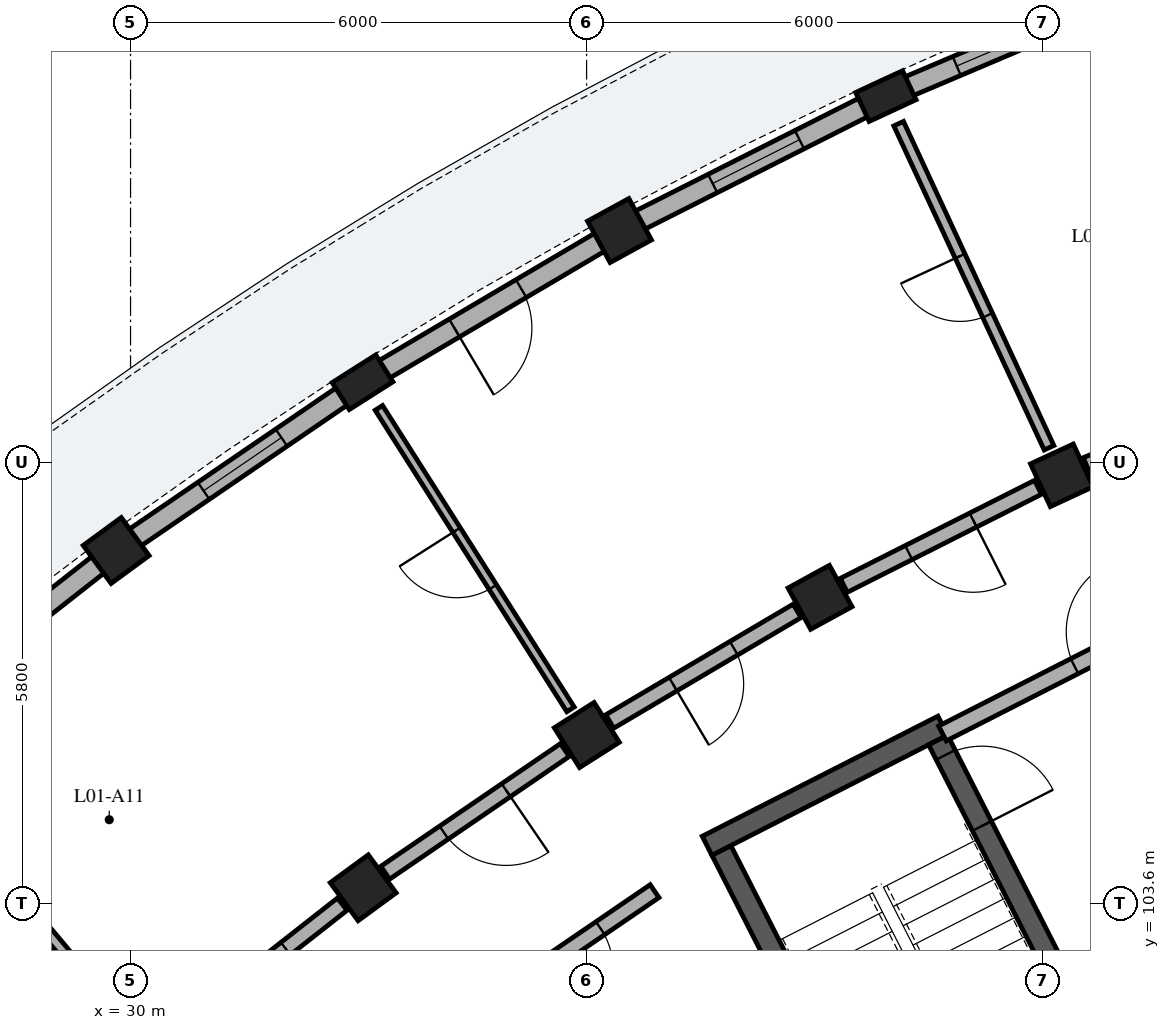
"""IFC4 building model, lengths in metres.
Left out: names, types, materials, properties, quantities, classifications, styles, units other than length and angle.
Written with IfcOpenShell. Run it as: python <this file> out.ifc"""

import sys

from ifc_helpers import new_model, si_unit, direction, frame, frame_2d, origin, origin_2d, place, context, subcontext, project, spatial, rectangle, extrude, element, fill, save


model = new_model("IFC4")
c1 = context("Model", 3, precision=1e-05, world=origin(), true_north=direction((0.0, 1.0)))
c2 = subcontext(c1, "Body", "Model", "MODEL_VIEW")
j1 = project(units=[si_unit("LENGTHUNIT", "METRE"), si_unit("PLANEANGLEUNIT", "RADIAN")], contexts=[c1])
p1 = place(None, origin())
s1 = spatial("IfcSite", under=j1, at=p1, CompositionType="ELEMENT")
p2 = place(p1, origin())
s2 = spatial("IfcBuilding", under=s1, at=p2, CompositionType="ELEMENT")
p3 = place(p2, frame((0.0, 0.0, 4.76)))
s3 = spatial("IfcBuildingStorey", under=s2, at=p3, CompositionType="ELEMENT", Elevation=4.76)
p4 = place(p3, frame((37.773, 104.296, 0.0), z_axis=(0.0, 0.0, 1.0), x_axis=(0.453992276384, -0.891005618941, 0.0)))
e1 = element("IfcWall", 1, at=p4, inside=s3, PredefinedType="SHEAR", context=c2, shape_type="SweptSolid", body=[
    extrude(rectangle(XDim=6.6, YDim=0.28, at=frame_2d((3.3, 0.0))), origin(), (0.0, 0.0, 1.0), 3.83),
])
p5 = place(p3, frame((37.585, 104.357, 0.0), z_axis=(0.0, 0.0, 1.0), x_axis=(0.891020222667, 0.453963613958, 0.0)))
e2 = element("IfcWall", 2, at=p5, inside=s3, PredefinedType="SHEAR", context=c2, shape_type="SweptSolid", body=[
    extrude(rectangle(XDim=3.48, YDim=0.28, at=frame_2d((1.74, 0.0))), origin(), (0.0, 0.0, 1.0), 3.83),
])
p6 = place(p3, frame((40.625, 105.748, 0.0), z_axis=(0.0, 0.0, 1.0), x_axis=(0.453992276384, -0.891005618941, 0.0)))
e3 = element("IfcWall", 3, at=p6, inside=s3, PredefinedType="SHEAR", context=c2, shape_type="SweptSolid", body=[
    extrude(rectangle(XDim=6.6, YDim=0.28, at=frame_2d((3.3, 0.0))), origin(), (0.0, 0.0, 1.0), 3.83),
])
p7 = place(p6, frame((0.22, 0.0, 0.0)))
e4 = element("IfcOpeningElement", 4, at=p7, cuts=e3, PredefinedType="OPENING", context=c2, shape_type="SweptSolid", body=[
    extrude(rectangle(XDim=1.05, YDim=2.15, at=frame_2d((0.525, 1.075))), frame((0.0, 0.15, 0.0), z_axis=(0.0, -1.0, 0.0), x_axis=(1.0, 0.0, 0.0)), (0.0, 0.0, 1.0), 0.3),
])
p8 = place(p3, frame((42.597, 102.561, 0.0), z_axis=(0.0, 0.0, 1.0), x_axis=(0.891001200497, 0.454000947921, 0.0)))
e5 = element("IfcWall", 5, at=p8, inside=s3, PredefinedType="SHEAR", context=c2, shape_type="SweptSolid", body=[
    extrude(rectangle(XDim=3.26, YDim=0.23, at=frame_2d((1.63, 0.0))), origin(), (0.0, 0.0, 1.0), 3.83),
])
p9 = place(p8, frame((0.9, 0.0, 0.0)))
e6 = element("IfcOpeningElement", 6, at=p9, cuts=e5, PredefinedType="OPENING", context=c2, shape_type="SweptSolid", body=[
    extrude(rectangle(XDim=1.1, YDim=2.15, at=frame_2d((0.55, 1.075))), frame((0.0, 0.125, 0.0), z_axis=(0.0, -1.0, 0.0), x_axis=(1.0, 0.0, 0.0)), (0.0, 0.0, 1.0), 0.25),
])
p10 = place(p3, frame((42.252, 109.23, 0.0), z_axis=(0.0, 0.0, 1.0), x_axis=(-0.420859924104, 0.907125638643, 0.0)))
e7 = element("IfcColumn", 7, at=p10, inside=s3, PredefinedType="COLUMN", context=c2, shape_type="SweptSolid", body=[
    extrude(rectangle(XDim=0.62, YDim=0.62, at=origin_2d()), origin(), (0.0, 0.0, 1.0), 3.825),
])
p11 = place(p3, frame((39.938, 114.219, 0.0), z_axis=(0.0, 0.0, 1.0), x_axis=(-0.420859924104, 0.907125638643, 0.0)))
e8 = element("IfcColumn", 8, at=p11, inside=s3, PredefinedType="PILASTER", context=c2, shape_type="SweptSolid", body=[
    extrude(rectangle(XDim=0.42, YDim=0.68, at=origin_2d()), origin(), (0.0, 0.0, 1.0), 3.825),
])
for number, where, z_axis, x_axis in (
    (9, (39.072, 107.625, 0.0), (0.0, 0.0, 1.0), (-0.48, 0.877, 0.0)),
    (10, (36.433, 112.451, 0.0), (0.0, 0.0, 1.0), (-0.48, 0.877, 0.0)),
    (11, (36.003, 105.813, 0.0), (0.0, 0.0, 1.0), (-0.536, 0.844, 0.0)),
):
    element("IfcColumn", number, at=place(p3, frame(where, z_axis=z_axis, x_axis=x_axis)), inside=s3, PredefinedType="COLUMN", context=c2, shape_type="SweptSolid", body=[
        extrude(rectangle(XDim=0.62, YDim=0.62, at=origin_2d()), origin(), (0.0, 0.0, 1.0), 3.825),
    ])
p12 = place(p3, frame((33.052, 110.455, 0.0), z_axis=(0.0, 0.0, 1.0), x_axis=(-0.536481603385, 0.843912015099, 0.0)))
e12 = element("IfcColumn", 12, at=p12, inside=s3, PredefinedType="PILASTER", context=c2, shape_type="SweptSolid", body=[
    extrude(rectangle(XDim=0.42, YDim=0.68, at=origin_2d()), origin(), (0.0, 0.0, 1.0), 3.825),
])
for number, where, z_axis, x_axis in (
    (13, (33.061, 103.804, 0.0), (0.0, 0.0, 1.0), (-0.591, 0.807, 0.0)),
    (14, (29.811, 108.241, 0.0), (0.0, 0.0, 1.0), (-0.591, 0.807, 0.0)),
):
    element("IfcColumn", number, at=place(p3, frame(where, z_axis=z_axis, x_axis=x_axis)), inside=s3, PredefinedType="COLUMN", context=c2, shape_type="SweptSolid", body=[
        extrude(rectangle(XDim=0.62, YDim=0.62, at=origin_2d()), origin(), (0.0, 0.0, 1.0), 3.825),
    ])
p13 = place(p3, frame((43.294, 115.644, 0.0), z_axis=(0.0, 0.0, 1.0), x_axis=(-0.920495033259, -0.390754262607, 0.0)))
e15 = element("IfcWall", 15, at=p13, inside=s3, PredefinedType="SOLIDWALL", context=c2, shape_type="SweptSolid", body=[
    extrude(rectangle(XDim=3.466, YDim=0.27, at=frame_2d((1.733, 0.0))), origin(), (0.0, 0.0, 1.0), 3.075),
])
p14 = place(p13, frame((0.833, 0.0, 0.55)))
e16 = element("IfcOpeningElement", 16, at=p14, cuts=e15, PredefinedType="OPENING", context=c2, shape_type="SweptSolid", body=[
    extrude(rectangle(XDim=1.8, YDim=1.85, at=frame_2d((0.9, 0.925))), frame((0.0, 0.145, 0.0), z_axis=(0.0, -1.0, 0.0), x_axis=(1.0, 0.0, 0.0)), (0.0, 0.0, 1.0), 0.29),
])
p15 = place(p3, frame((39.777, 114.138, 0.0), z_axis=(0.0, 0.0, 1.0), x_axis=(-0.892772658884, -0.450507468915, 0.0)))
e17 = element("IfcWall", 17, at=p15, inside=s3, PredefinedType="SOLIDWALL", context=c2, shape_type="SweptSolid", body=[
    extrude(rectangle(XDim=3.466, YDim=0.27, at=frame_2d((1.733, 0.0))), origin(), (0.0, 0.0, 1.0), 3.075),
])
p16 = place(p15, frame((1.093, 0.0, 0.55)))
e18 = element("IfcOpeningElement", 18, at=p16, cuts=e17, PredefinedType="OPENING", context=c2, shape_type="SweptSolid", body=[
    extrude(rectangle(XDim=1.28, YDim=1.52, at=frame_2d((0.64, 0.76))), frame((0.0, 0.145, 0.0), z_axis=(0.0, -1.0, 0.0), x_axis=(1.0, 0.0, 0.0)), (0.0, 0.0, 1.0), 0.29),
])
p17 = place(p3, frame((36.192, 112.308, 0.0), z_axis=(0.0, 0.0, 1.0), x_axis=(-0.861120000949, -0.508401754487, 0.0)))
e19 = element("IfcWall", 19, at=p17, inside=s3, PredefinedType="SOLIDWALL", context=c2, shape_type="SweptSolid", body=[
    extrude(rectangle(XDim=3.466, YDim=0.27, at=frame_2d((1.733, 0.0))), origin(), (0.0, 0.0, 1.0), 3.075),
])
p18 = place(p17, frame((1.223, 0.0, 0.0)))
e20 = element("IfcOpeningElement", 20, at=p18, cuts=e19, PredefinedType="OPENING", context=c2, shape_type="SweptSolid", body=[
    extrude(rectangle(XDim=1.02, YDim=2.14, at=frame_2d((0.51, 1.07))), frame((0.0, 0.145, 0.0), z_axis=(0.0, -1.0, 0.0), x_axis=(1.0, 0.0, 0.0)), (0.0, 0.0, 1.0), 0.29),
])
p19 = place(p3, frame((32.904, 110.354, 0.0), z_axis=(0.0, 0.0, 1.0), x_axis=(-0.825744165268, -0.564044832904, 0.0)))
e21 = element("IfcWall", 21, at=p19, inside=s3, PredefinedType="SOLIDWALL", context=c2, shape_type="SweptSolid", body=[
    extrude(rectangle(XDim=3.466, YDim=0.27, at=frame_2d((1.733, 0.0))), origin(), (0.0, 0.0, 1.0), 3.075),
])
p20 = place(p19, frame((1.113, 0.0, 0.55)))
e22 = element("IfcOpeningElement", 22, at=p20, cuts=e21, PredefinedType="OPENING", context=c2, shape_type="SweptSolid", body=[
    extrude(rectangle(XDim=1.24, YDim=1.535, at=frame_2d((0.62, 0.768))), frame((0.0, 0.145, 0.0), z_axis=(0.0, -1.0, 0.0), x_axis=(1.0, 0.0, 0.0)), (0.0, 0.0, 1.0), 0.29),
])
p21 = place(p3, frame((29.591, 108.068, 0.0), z_axis=(0.0, 0.0, 1.0), x_axis=(-0.786811832484, -0.617192952214, 0.0)))
e23 = element("IfcWall", 23, at=p21, inside=s3, PredefinedType="SOLIDWALL", context=c2, shape_type="SweptSolid", body=[
    extrude(rectangle(XDim=3.466, YDim=0.27, at=frame_2d((1.733, 0.0))), origin(), (0.0, 0.0, 1.0), 3.075),
])
p22 = place(p21, frame((1.053, 0.0, 0.55)))
e24 = element("IfcOpeningElement", 24, at=p22, cuts=e23, PredefinedType="OPENING", context=c2, shape_type="SweptSolid", body=[
    extrude(rectangle(XDim=1.36, YDim=1.61, at=frame_2d((0.68, 0.805))), frame((0.0, 0.145, 0.0), z_axis=(0.0, -1.0, 0.0), x_axis=(1.0, 0.0, 0.0)), (0.0, 0.0, 1.0), 0.29),
])
p23 = place(p3, frame((40.682, 105.834, 0.0), z_axis=(0.0, 0.0, 1.0), x_axis=(0.891003372311, 0.453996685595, 0.0)))
e25 = element("IfcWall", 25, at=p23, inside=s3, PredefinedType="PARTITIONING", context=c2, shape_type="SweptSolid", body=[
    extrude(rectangle(XDim=4.9, YDim=0.22, at=frame_2d((2.45, 0.0))), origin(), (0.0, 0.0, 1.0), 3.06),
])
p24 = place(p23, frame((1.95, 0.0, 0.0)))
e26 = element("IfcOpeningElement", 26, at=p24, cuts=e25, PredefinedType="OPENING", context=c2, shape_type="SweptSolid", body=[
    extrude(rectangle(XDim=1.0, YDim=2.15, at=frame_2d((0.5, 1.075))), frame((0.0, 0.12, 0.0), z_axis=(0.0, -1.0, 0.0), x_axis=(1.0, 0.0, 0.0)), (0.0, 0.0, 1.0), 0.24),
])
p25 = place(p3, frame((45.21, 110.486, 0.0), z_axis=(0.0, 0.0, 1.0), x_axis=(-0.920511160294, -0.390716270168, 0.0)))
e27 = element("IfcWall", 27, at=p25, inside=s3, PredefinedType="PARTITIONING", context=c2, shape_type="SweptSolid", body=[
    extrude(rectangle(XDim=2.863, YDim=0.205, at=frame_2d((1.432, 0.0))), origin(), (0.0, 0.0, 1.0), 3.09),
])
p26 = place(p25, frame((0.947, 0.0, 0.0)))
e28 = element("IfcOpeningElement", 28, at=p26, cuts=e27, PredefinedType="OPENING", context=c2, shape_type="SweptSolid", body=[
    extrude(rectangle(XDim=0.97, YDim=2.15, at=frame_2d((0.485, 1.075))), frame((0.0, 0.113, 0.0), z_axis=(0.0, -1.0, 0.0), x_axis=(1.0, 0.0, 0.0)), (0.0, 0.0, 1.0), 0.225),
])
p27 = place(p3, frame((42.084, 109.593, 0.0), z_axis=(0.0, 0.0, 1.0), x_axis=(-0.420862519045, 0.907124434718, 0.0)))
e29 = element("IfcWall", 29, at=p27, inside=s3, PredefinedType="PLUMBINGWALL", context=c2, shape_type="SweptSolid", body=[
    extrude(rectangle(XDim=4.7, YDim=0.14, at=frame_2d((2.35, 0.0))), origin(), (0.0, 0.0, 1.0), 3.09),
])
p28 = place(p27, frame((1.92, 0.0, 0.0)))
e30 = element("IfcOpeningElement", 30, at=p28, cuts=e29, PredefinedType="OPENING", context=c2, shape_type="SweptSolid", body=[
    extrude(rectangle(XDim=0.86, YDim=2.06, at=frame_2d((0.43, 1.03))), frame((0.0, 0.08, 0.0), z_axis=(0.0, -1.0, 0.0), x_axis=(1.0, 0.0, 0.0)), (0.0, 0.0, 1.0), 0.16),
])
p29 = place(p3, frame((41.94, 109.073, 0.0), z_axis=(0.0, 0.0, 1.0), x_axis=(-0.89273239336, -0.450587254419, 0.0)))
e31 = element("IfcWall", 31, at=p29, inside=s3, PredefinedType="PARTITIONING", context=c2, shape_type="SweptSolid", body=[
    extrude(rectangle(XDim=2.863, YDim=0.205, at=frame_2d((1.432, 0.0))), origin(), (0.0, 0.0, 1.0), 3.09),
])
p30 = place(p29, frame((0.957, 0.0, 0.0)))
e32 = element("IfcOpeningElement", 32, at=p30, cuts=e31, PredefinedType="OPENING", context=c2, shape_type="SweptSolid", body=[
    extrude(rectangle(XDim=0.95, YDim=2.13, at=frame_2d((0.475, 1.065))), frame((0.0, 0.113, 0.0), z_axis=(0.0, -1.0, 0.0), x_axis=(1.0, 0.0, 0.0)), (0.0, 0.0, 1.0), 0.225),
])
p31 = place(p3, frame((38.77, 107.447, 0.0), z_axis=(0.0, 0.0, 1.0), x_axis=(-0.861113214678, -0.508413248753, 0.0)))
e33 = element("IfcWall", 33, at=p31, inside=s3, PredefinedType="PARTITIONING", context=c2, shape_type="SweptSolid", body=[
    extrude(rectangle(XDim=2.863, YDim=0.205, at=frame_2d((1.432, 0.0))), origin(), (0.0, 0.0, 1.0), 3.09),
])
p32 = place(p31, frame((0.967, 0.0, 0.0)))
e34 = element("IfcOpeningElement", 34, at=p32, cuts=e33, PredefinedType="OPENING", context=c2, shape_type="SweptSolid", body=[
    extrude(rectangle(XDim=0.93, YDim=2.12, at=frame_2d((0.465, 1.06))), frame((0.0, 0.113, 0.0), z_axis=(0.0, -1.0, 0.0), x_axis=(1.0, 0.0, 0.0)), (0.0, 0.0, 1.0), 0.225),
])
p33 = place(p3, frame((35.789, 106.151, 0.0), z_axis=(0.0, 0.0, 1.0), x_axis=(-0.536492262982, 0.843905238614, 0.0)))
e35 = element("IfcWall", 35, at=p33, inside=s3, PredefinedType="PARTITIONING", context=c2, shape_type="SweptSolid", body=[
    extrude(rectangle(XDim=4.7, YDim=0.115, at=frame_2d((2.35, 0.0))), origin(), (0.0, 0.0, 1.0), 3.09),
])
p34 = place(p33, frame((1.905, 0.0, 0.0)))
e36 = element("IfcOpeningElement", 36, at=p34, cuts=e35, PredefinedType="OPENING", context=c2, shape_type="SweptSolid", body=[
    extrude(rectangle(XDim=0.89, YDim=2.1, at=frame_2d((0.445, 1.05))), frame((0.0, 0.067, 0.0), z_axis=(0.0, -1.0, 0.0), x_axis=(1.0, 0.0, 0.0)), (0.0, 0.0, 1.0), 0.135),
])
p35 = place(p3, frame((35.714, 105.616, 0.0), z_axis=(0.0, 0.0, 1.0), x_axis=(-0.825779671787, -0.563992848947, 0.0)))
e37 = element("IfcWall", 37, at=p35, inside=s3, PredefinedType="PARTITIONING", context=c2, shape_type="SweptSolid", body=[
    extrude(rectangle(XDim=2.863, YDim=0.205, at=frame_2d((1.432, 0.0))), origin(), (0.0, 0.0, 1.0), 3.09),
])
p36 = place(p35, frame((0.937, 0.0, 0.0)))
e38 = element("IfcOpeningElement", 38, at=p36, cuts=e37, PredefinedType="OPENING", context=c2, shape_type="SweptSolid", body=[
    extrude(rectangle(XDim=0.99, YDim=2.16, at=frame_2d((0.495, 1.08))), frame((0.0, 0.113, 0.0), z_axis=(0.0, -1.0, 0.0), x_axis=(1.0, 0.0, 0.0)), (0.0, 0.0, 1.0), 0.225),
])
p37 = place(p3, frame((36.895, 103.76, 0.0), z_axis=(0.0, 0.0, 1.0), x_axis=(-0.825752009056, -0.56403334967, 0.0)))
e39 = element("IfcWall", 39, at=p37, inside=s3, PredefinedType="PARTITIONING", context=c2, shape_type="SweptSolid", body=[
    extrude(rectangle(XDim=2.718, YDim=0.205, at=frame_2d((1.359, 0.0))), origin(), (0.0, 0.0, 1.0), 3.09),
])
p38 = place(p37, frame((0.864, 0.0, 0.0)))
e40 = element("IfcOpeningElement", 40, at=p38, cuts=e39, PredefinedType="OPENING", context=c2, shape_type="SweptSolid", body=[
    extrude(rectangle(XDim=0.99, YDim=2.16, at=frame_2d((0.495, 1.08))), frame((0.0, 0.113, 0.0), z_axis=(0.0, -1.0, 0.0), x_axis=(1.0, 0.0, 0.0)), (0.0, 0.0, 1.0), 0.225),
])
p39 = place(p3, frame((32.785, 103.588, 0.0), z_axis=(0.0, 0.0, 1.0), x_axis=(-0.786806323554, -0.617199975061, 0.0)))
e41 = element("IfcWall", 41, at=p39, inside=s3, PredefinedType="PARTITIONING", context=c2, shape_type="SweptSolid", body=[
    extrude(rectangle(XDim=2.863, YDim=0.205, at=frame_2d((1.432, 0.0))), origin(), (0.0, 0.0, 1.0), 3.09),
])
p40 = place(p39, frame((0.947, 0.0, 0.0)))
e42 = element("IfcOpeningElement", 42, at=p40, cuts=e41, PredefinedType="OPENING", context=c2, shape_type="SweptSolid", body=[
    extrude(rectangle(XDim=0.97, YDim=2.15, at=frame_2d((0.485, 1.075))), frame((0.0, 0.113, 0.0), z_axis=(0.0, -1.0, 0.0), x_axis=(1.0, 0.0, 0.0)), (0.0, 0.0, 1.0), 0.225),
])
p41 = place(p3, frame((30.0, 101.911, 0.0), z_axis=(0.0, 0.0, 1.0), x_axis=(-0.642811926223, 0.766024038465, 0.0)))
e43 = element("IfcWall", 43, at=p41, inside=s3, PredefinedType="PLUMBINGWALL", context=c2, shape_type="SweptSolid", body=[
    extrude(rectangle(XDim=4.7, YDim=0.14, at=frame_2d((2.35, 0.0))), origin(), (0.0, 0.0, 1.0), 3.09),
])
p42 = place(p41, frame((1.92, 0.0, 0.0)))
e44 = element("IfcOpeningElement", 44, at=p42, cuts=e43, PredefinedType="OPENING", context=c2, shape_type="SweptSolid", body=[
    extrude(rectangle(XDim=0.86, YDim=2.06, at=frame_2d((0.43, 1.03))), frame((0.0, 0.08, 0.0), z_axis=(0.0, -1.0, 0.0), x_axis=(1.0, 0.0, 0.0)), (0.0, 0.0, 1.0), 0.16),
])
p43 = place(p14, origin())
e45 = element("IfcWindow", 45, at=p43, inside=s3, PartitioningType="SINGLE_PANEL", PredefinedType="WINDOW", context=c2, shape_type="SweptSolid", body=[
    extrude(rectangle(XDim=1.8, YDim=1.85, at=frame_2d((0.9, 0.925))), frame((0.0, 0.03, 0.0), z_axis=(0.0, -1.0, 0.0), x_axis=(1.0, 0.0, 0.0)), (0.0, 0.0, 1.0), 0.06),
])
fill(e16, e45)
p44 = place(p16, origin())
e46 = element("IfcWindow", 46, at=p44, inside=s3, PartitioningType="SINGLE_PANEL", PredefinedType="WINDOW", context=c2, shape_type="SweptSolid", body=[
    extrude(rectangle(XDim=1.28, YDim=1.52, at=frame_2d((0.64, 0.76))), frame((0.0, 0.03, 0.0), z_axis=(0.0, -1.0, 0.0), x_axis=(1.0, 0.0, 0.0)), (0.0, 0.0, 1.0), 0.06),
])
fill(e18, e46)
p45 = place(p18, origin())
e47 = element("IfcDoor", 47, at=p45, inside=s3, OperationType="SINGLE_SWING_RIGHT", PredefinedType="DOOR", context=c2, shape_type="SweptSolid", body=[
    extrude(rectangle(XDim=1.02, YDim=2.14, at=frame_2d((0.51, 1.07))), frame((0.0, 0.025, 0.0), z_axis=(0.0, -1.0, 0.0), x_axis=(1.0, 0.0, 0.0)), (0.0, 0.0, 1.0), 0.05),
])
fill(e20, e47)
p46 = place(p20, origin())
e48 = element("IfcWindow", 48, at=p46, inside=s3, PartitioningType="SINGLE_PANEL", PredefinedType="WINDOW", context=c2, shape_type="SweptSolid", body=[
    extrude(rectangle(XDim=1.24, YDim=1.535, at=frame_2d((0.62, 0.768))), frame((0.0, 0.03, 0.0), z_axis=(0.0, -1.0, 0.0), x_axis=(1.0, 0.0, 0.0)), (0.0, 0.0, 1.0), 0.06),
])
fill(e22, e48)
p47 = place(p7, origin())
e49 = element("IfcDoor", 49, at=p47, inside=s3, OperationType="SINGLE_SWING_RIGHT", PredefinedType="DOOR", context=c2, shape_type="SweptSolid", body=[
    extrude(rectangle(XDim=1.05, YDim=2.15, at=frame_2d((0.525, 1.075))), frame((0.0, 0.025, 0.0), z_axis=(0.0, -1.0, 0.0), x_axis=(1.0, 0.0, 0.0)), (0.0, 0.0, 1.0), 0.05),
])
fill(e4, e49)
p48 = place(p24, origin())
e50 = element("IfcDoor", 50, at=p48, inside=s3, OperationType="SINGLE_SWING_RIGHT", PredefinedType="DOOR", context=c2, shape_type="SweptSolid", body=[
    extrude(rectangle(XDim=1.0, YDim=2.15, at=frame_2d((0.5, 1.075))), frame((0.0, 0.025, 0.0), z_axis=(0.0, -1.0, 0.0), x_axis=(1.0, 0.0, 0.0)), (0.0, 0.0, 1.0), 0.05),
])
fill(e26, e50)
p49 = place(p28, origin())
e51 = element("IfcDoor", 51, at=p49, inside=s3, OperationType="SINGLE_SWING_RIGHT", PredefinedType="DOOR", context=c2, shape_type="SweptSolid", body=[
    extrude(rectangle(XDim=0.86, YDim=2.06, at=frame_2d((0.43, 1.03))), frame((0.0, 0.025, 0.0), z_axis=(0.0, -1.0, 0.0), x_axis=(1.0, 0.0, 0.0)), (0.0, 0.0, 1.0), 0.05),
])
fill(e30, e51)
p50 = place(p30, origin())
e52 = element("IfcDoor", 52, at=p50, inside=s3, OperationType="SINGLE_SWING_LEFT", PredefinedType="DOOR", context=c2, shape_type="SweptSolid", body=[
    extrude(rectangle(XDim=0.95, YDim=2.13, at=frame_2d((0.475, 1.065))), frame((0.0, 0.025, 0.0), z_axis=(0.0, -1.0, 0.0), x_axis=(1.0, 0.0, 0.0)), (0.0, 0.0, 1.0), 0.05),
])
fill(e32, e52)
p51 = place(p32, origin())
e53 = element("IfcDoor", 53, at=p51, inside=s3, OperationType="SINGLE_SWING_RIGHT", PredefinedType="DOOR", context=c2, shape_type="SweptSolid", body=[
    extrude(rectangle(XDim=0.93, YDim=2.12, at=frame_2d((0.465, 1.06))), frame((0.0, 0.025, 0.0), z_axis=(0.0, -1.0, 0.0), x_axis=(1.0, 0.0, 0.0)), (0.0, 0.0, 1.0), 0.05),
])
fill(e34, e53)
p52 = place(p34, origin())
e54 = element("IfcDoor", 54, at=p52, inside=s3, OperationType="SINGLE_SWING_RIGHT", PredefinedType="DOOR", context=c2, shape_type="SweptSolid", body=[
    extrude(rectangle(XDim=0.89, YDim=2.1, at=frame_2d((0.445, 1.05))), frame((0.0, 0.025, 0.0), z_axis=(0.0, -1.0, 0.0), x_axis=(1.0, 0.0, 0.0)), (0.0, 0.0, 1.0), 0.05),
])
fill(e36, e54)
p53 = place(p36, origin())
e55 = element("IfcDoor", 55, at=p53, inside=s3, OperationType="SINGLE_SWING_LEFT", PredefinedType="DOOR", context=c2, shape_type="SweptSolid", body=[
    extrude(rectangle(XDim=0.99, YDim=2.16, at=frame_2d((0.495, 1.08))), frame((0.0, 0.025, 0.0), z_axis=(0.0, -1.0, 0.0), x_axis=(1.0, 0.0, 0.0)), (0.0, 0.0, 1.0), 0.05),
])
fill(e38, e55)
p54 = place(p38, origin())
e56 = element("IfcDoor", 56, at=p54, inside=s3, OperationType="SINGLE_SWING_RIGHT", PredefinedType="DOOR", context=c2, shape_type="SweptSolid", body=[
    extrude(rectangle(XDim=0.99, YDim=2.16, at=frame_2d((0.495, 1.08))), frame((0.0, 0.025, 0.0), z_axis=(0.0, -1.0, 0.0), x_axis=(1.0, 0.0, 0.0)), (0.0, 0.0, 1.0), 0.05),
])
fill(e40, e56)
p55 = place(p40, origin())
e57 = element("IfcDoor", 57, at=p55, inside=s3, OperationType="SINGLE_SWING_RIGHT", PredefinedType="DOOR", context=c2, shape_type="SweptSolid", body=[
    extrude(rectangle(XDim=0.97, YDim=2.15, at=frame_2d((0.485, 1.075))), frame((0.0, 0.025, 0.0), z_axis=(0.0, -1.0, 0.0), x_axis=(1.0, 0.0, 0.0)), (0.0, 0.0, 1.0), 0.05),
])
fill(e42, e57)
save(model, sys.argv[1])
